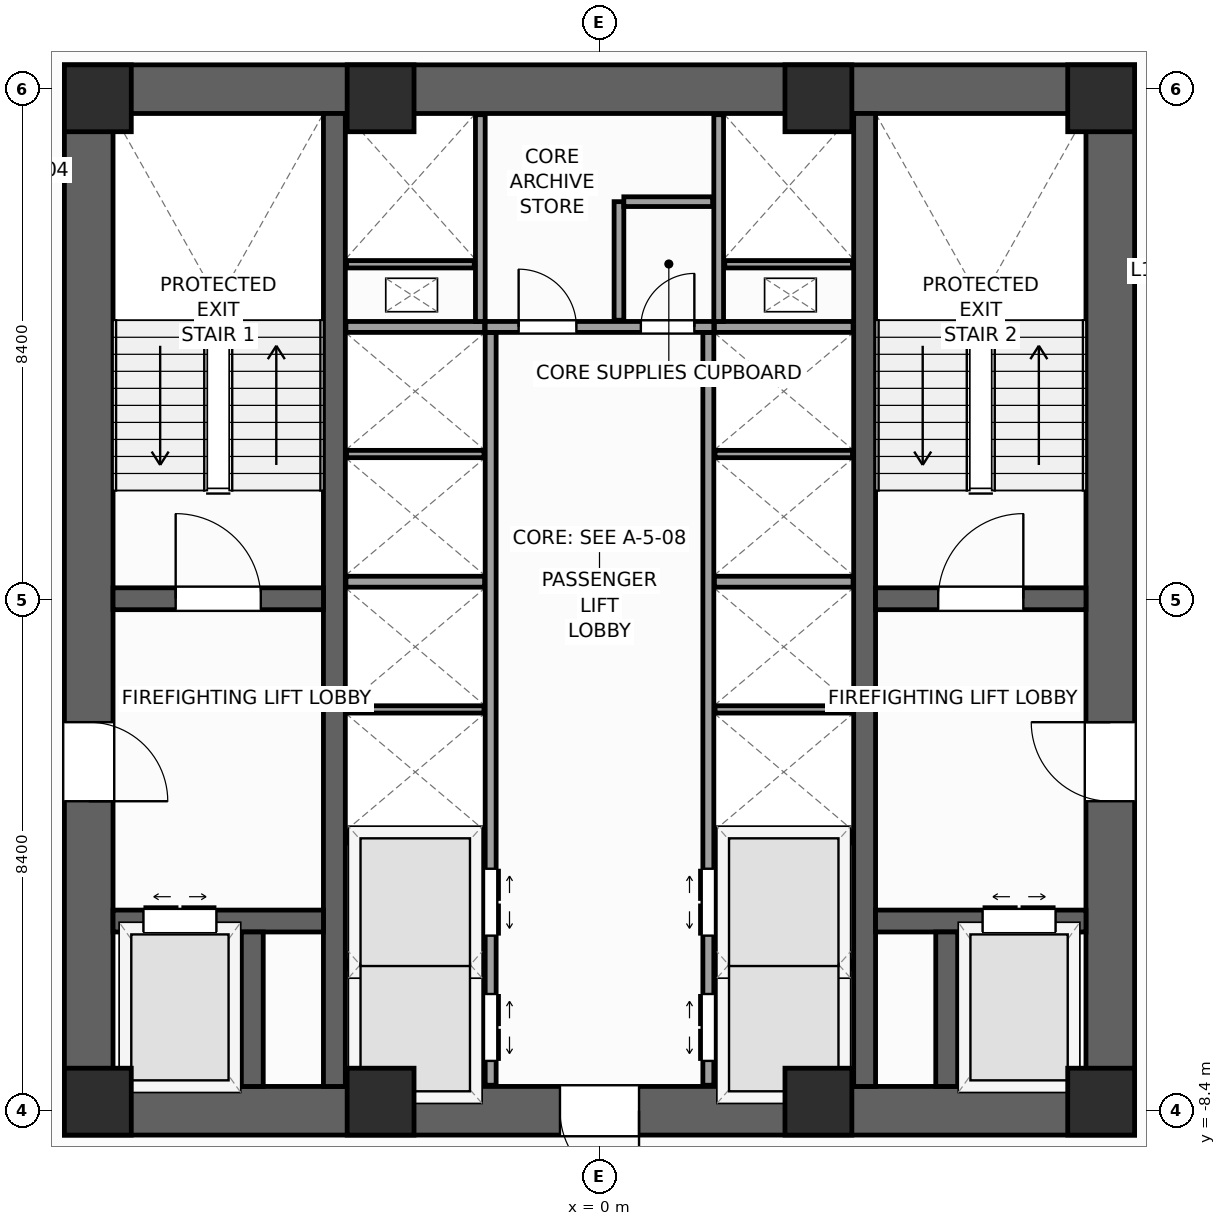
"""IFC4 building model, lengths in metres.
Left out: names, types, materials, properties, quantities, classifications, styles, units other than length and angle.
Written with IfcOpenShell. Run it as: python <this file> out.ifc"""

import sys

from ifc_helpers import new_model, si_unit, direction, frame, frame_2d, origin, origin_2d, place, context, subcontext, project, spatial, rectangle, extrude, source, transform, mapped, element, fill, save


model = new_model("IFC4")
c1 = context("Model", 3, precision=1e-05, world=origin(), true_north=direction((0.0, 1.0)))
c2 = subcontext(c1, "Body", "Model", "MODEL_VIEW")
j1 = project(units=[si_unit("LENGTHUNIT", "METRE"), si_unit("PLANEANGLEUNIT", "RADIAN")], contexts=[c1])
p1 = place(None, origin())
s1 = spatial("IfcSite", under=j1, at=p1, CompositionType="ELEMENT")
p2 = place(p1, origin())
s2 = spatial("IfcBuilding", under=s1, at=p2, CompositionType="ELEMENT")
p3 = place(p2, frame((0.0, 0.0, 66.0)))
s3 = spatial("IfcBuildingStorey", under=s2, at=p3, CompositionType="ELEMENT", Elevation=66.0)
p4 = place(p3, frame((-8.8, -8.4, 0.0), z_axis=(0.0, 0.0, 1.0), x_axis=(1.0, 0.0, 0.0)))
e1 = element("IfcWall", 1, at=p4, inside=s3, PredefinedType="SHEAR", context=c2, shape_type="SweptSolid", body=[
    extrude(rectangle(XDim=17.6, YDim=0.8, at=frame_2d((8.8, 0.0))), origin(), (0.0, 0.0, 1.0), 4.0),
])
p5 = place(p4, frame((8.15, 0.0, 0.0)))
e2 = element("IfcOpeningElement", 2, at=p5, cuts=e1, PredefinedType="OPENING", context=c2, shape_type="SweptSolid", body=[
    extrude(rectangle(XDim=1.3, YDim=2.2, at=frame_2d((0.65, 1.1))), frame((0.0, 0.41, 0.0), z_axis=(0.0, -1.0, 0.0), x_axis=(1.0, 0.0, 0.0)), (0.0, 0.0, 1.0), 0.82),
])
p6 = place(p3, frame((-8.8, 8.4, 0.0), z_axis=(0.0, 0.0, 1.0), x_axis=(1.0, 0.0, 0.0)))
e3 = element("IfcWall", 3, at=p6, inside=s3, PredefinedType="SHEAR", context=c2, shape_type="SweptSolid", body=[
    extrude(rectangle(XDim=17.6, YDim=0.8, at=frame_2d((8.8, 0.0))), origin(), (0.0, 0.0, 1.0), 4.0),
])
p7 = place(p3, frame((-8.4, -8.0, 0.0), z_axis=(0.0, 0.0, 1.0), x_axis=(0.0, 1.0, 0.0)))
e4 = element("IfcWall", 4, at=p7, inside=s3, PredefinedType="SHEAR", context=c2, shape_type="SweptSolid", body=[
    extrude(rectangle(XDim=16.0, YDim=0.8, at=frame_2d((8.0, 0.0))), origin(), (0.0, 0.0, 1.0), 4.0),
])
p8 = place(p7, frame((4.69, 0.0, 0.0)))
e5 = element("IfcOpeningElement", 5, at=p8, cuts=e4, PredefinedType="OPENING", context=c2, shape_type="SweptSolid", body=[
    extrude(rectangle(XDim=1.3, YDim=2.2, at=frame_2d((0.65, 1.1))), frame((0.0, 0.41, 0.0), z_axis=(0.0, -1.0, 0.0), x_axis=(1.0, 0.0, 0.0)), (0.0, 0.0, 1.0), 0.82),
])
p9 = place(p3, frame((8.4, -8.0, 0.0), z_axis=(0.0, 0.0, 1.0), x_axis=(0.0, 1.0, 0.0)))
e6 = element("IfcWall", 6, at=p9, inside=s3, PredefinedType="SHEAR", context=c2, shape_type="SweptSolid", body=[
    extrude(rectangle(XDim=16.0, YDim=0.8, at=frame_2d((8.0, 0.0))), origin(), (0.0, 0.0, 1.0), 4.0),
])
p10 = place(p9, frame((4.69, 0.0, 0.0)))
e7 = element("IfcOpeningElement", 7, at=p10, cuts=e6, PredefinedType="OPENING", context=c2, shape_type="SweptSolid", body=[
    extrude(rectangle(XDim=1.3, YDim=2.2, at=frame_2d((0.65, 1.1))), frame((0.0, 0.41, 0.0), z_axis=(0.0, -1.0, 0.0), x_axis=(1.0, 0.0, 0.0)), (0.0, 0.0, 1.0), 0.82),
])
for number, where, z_axis, x_axis in (
    (8, (-4.36, -8.0, 0.0), (0.0, 0.0, 1.0), (0.0, 1.0, 0.0)),
    (9, (4.36, -8.0, 0.0), (0.0, 0.0, 1.0), (0.0, 1.0, 0.0)),
):
    element("IfcWall", number, at=place(p3, frame(where, z_axis=z_axis, x_axis=x_axis)), inside=s3, PredefinedType="SHEAR", context=c2, shape_type="SweptSolid", body=[
        extrude(rectangle(XDim=16.0, YDim=0.36, at=frame_2d((8.0, 0.0))), origin(), (0.0, 0.0, 1.0), 4.0),
    ])
p11 = place(p3, frame((-8.0, 0.02, 0.0), z_axis=(0.0, 0.0, 1.0), x_axis=(1.0, 0.0, 0.0)))
e10 = element("IfcWall", 10, at=p11, inside=s3, PredefinedType="SHEAR", context=c2, shape_type="SweptSolid", body=[
    extrude(rectangle(XDim=3.46, YDim=0.36, at=frame_2d((1.73, 0.0))), origin(), (0.0, 0.0, 1.0), 4.0),
])
p12 = place(p11, frame((1.03, 0.0, 0.0)))
e11 = element("IfcOpeningElement", 11, at=p12, cuts=e10, PredefinedType="OPENING", context=c2, shape_type="SweptSolid", body=[
    extrude(rectangle(XDim=1.4, YDim=2.2, at=frame_2d((0.7, 1.1))), frame((0.0, 0.19, 0.0), z_axis=(0.0, -1.0, 0.0), x_axis=(1.0, 0.0, 0.0)), (0.0, 0.0, 1.0), 0.38),
])
p13 = place(p3, frame((4.54, 0.02, 0.0), z_axis=(0.0, 0.0, 1.0), x_axis=(1.0, 0.0, 0.0)))
e12 = element("IfcWall", 12, at=p13, inside=s3, PredefinedType="SHEAR", context=c2, shape_type="SweptSolid", body=[
    extrude(rectangle(XDim=3.46, YDim=0.36, at=frame_2d((1.73, 0.0))), origin(), (0.0, 0.0, 1.0), 4.0),
])
p14 = place(p13, frame((1.03, 0.0, 0.0)))
e13 = element("IfcOpeningElement", 13, at=p14, cuts=e12, PredefinedType="OPENING", context=c2, shape_type="SweptSolid", body=[
    extrude(rectangle(XDim=1.4, YDim=2.2, at=frame_2d((0.7, 1.1))), frame((0.0, 0.19, 0.0), z_axis=(0.0, -1.0, 0.0), x_axis=(1.0, 0.0, 0.0)), (0.0, 0.0, 1.0), 0.38),
])
p15 = place(p3, frame((-8.0, -5.28, 0.0), z_axis=(0.0, 0.0, 1.0), x_axis=(1.0, 0.0, 0.0)))
e14 = element("IfcWall", 14, at=p15, inside=s3, PredefinedType="SHEAR", context=c2, shape_type="SweptSolid", body=[
    extrude(rectangle(XDim=3.46, YDim=0.36, at=frame_2d((1.73, 0.0))), origin(), (0.0, 0.0, 1.0), 4.0),
])
p16 = place(p15, frame((0.5, 0.0, 0.0)))
e15 = element("IfcOpeningElement", 15, at=p16, cuts=e14, PredefinedType="OPENING", context=c2, shape_type="SweptSolid", body=[
    extrude(rectangle(XDim=1.2, YDim=2.25, at=frame_2d((0.6, 1.125))), frame((0.0, 0.19, 0.0), z_axis=(0.0, -1.0, 0.0), x_axis=(1.0, 0.0, 0.0)), (0.0, 0.0, 1.0), 0.38),
])
p17 = place(p3, frame((4.54, -5.28, 0.0), z_axis=(0.0, 0.0, 1.0), x_axis=(1.0, 0.0, 0.0)))
e16 = element("IfcWall", 16, at=p17, inside=s3, PredefinedType="SHEAR", context=c2, shape_type="SweptSolid", body=[
    extrude(rectangle(XDim=3.46, YDim=0.36, at=frame_2d((1.73, 0.0))), origin(), (0.0, 0.0, 1.0), 4.0),
])
p18 = place(p17, frame((1.76, 0.0, 0.0)))
e17 = element("IfcOpeningElement", 17, at=p18, cuts=e16, PredefinedType="OPENING", context=c2, shape_type="SweptSolid", body=[
    extrude(rectangle(XDim=1.2, YDim=2.25, at=frame_2d((0.6, 1.125))), frame((0.0, 0.19, 0.0), z_axis=(0.0, -1.0, 0.0), x_axis=(1.0, 0.0, 0.0)), (0.0, 0.0, 1.0), 0.38),
])
for number, where, z_axis, x_axis in (
    (18, (-5.71, -8.0, 0.0), (0.0, 0.0, 1.0), (0.0, 1.0, 0.0)),
    (19, (5.71, -8.0, 0.0), (0.0, 0.0, 1.0), (0.0, 1.0, 0.0)),
):
    element("IfcWall", number, at=place(p3, frame(where, z_axis=z_axis, x_axis=x_axis)), inside=s3, PredefinedType="SHEAR", context=c2, shape_type="SweptSolid", body=[
        extrude(rectangle(XDim=2.54, YDim=0.36, at=frame_2d((1.27, 0.0))), origin(), (0.0, 0.0, 1.0), 4.0),
    ])
m1 = source(origin(), c2, "Body", "SweptSolid", [
    extrude(rectangle(XDim=1.1, YDim=1.1, at=origin_2d()), origin(), (0.0, 0.0, 1.0), 4.0),
])
for number, where, z_axis, x_axis in (
    (20, (-8.25, -8.25, 0.0), (0.0, 0.0, 1.0), (1.0, 0.0, 0.0)),
    (21, (8.25, -8.25, 0.0), (0.0, 0.0, 1.0), (1.0, 0.0, 0.0)),
    (22, (8.25, 8.25, 0.0), (0.0, 0.0, 1.0), (1.0, 0.0, 0.0)),
    (23, (-8.25, 8.25, 0.0), (0.0, 0.0, 1.0), (1.0, 0.0, 0.0)),
    (24, (-3.6, -8.25, 0.0), (0.0, 0.0, 1.0), (1.0, 0.0, 0.0)),
    (25, (3.6, -8.25, 0.0), (0.0, 0.0, 1.0), (1.0, 0.0, 0.0)),
    (26, (-3.6, 8.25, 0.0), (0.0, 0.0, 1.0), (1.0, 0.0, 0.0)),
    (27, (3.6, 8.25, 0.0), (0.0, 0.0, 1.0), (1.0, 0.0, 0.0)),
):
    element("IfcColumn", number, at=place(p3, frame(where, z_axis=z_axis, x_axis=x_axis)), inside=s3, PredefinedType="PILASTER", context=c2, shape_type="MappedRepresentation", body=[
        mapped(m1, transform((0.0, 0.0, 0.0), scale=1.0)),
    ])
p19 = place(p3, frame((-1.79, -7.98, 0.0), z_axis=(0.0, 0.0, 1.0), x_axis=(0.0, 1.0, 0.0)))
e28 = element("IfcWall", 28, at=p19, inside=s3, PredefinedType="PARTITIONING", context=c2, shape_type="SweptSolid", body=[
    extrude(rectangle(XDim=12.38, YDim=0.18, at=frame_2d((6.19, 0.0))), origin(), (0.0, 0.0, 1.0), 3.72),
])
p20 = place(p19, frame((0.4, 0.0, 0.0)))
e29 = element("IfcOpeningElement", 29, at=p20, cuts=e28, PredefinedType="OPENING", context=c2, shape_type="SweptSolid", body=[
    extrude(rectangle(XDim=1.1, YDim=2.2, at=frame_2d((0.55, 1.1))), frame((0.0, 0.1, 0.0), z_axis=(0.0, -1.0, 0.0), x_axis=(1.0, 0.0, 0.0)), (0.0, 0.0, 1.0), 0.2),
])
p21 = place(p19, frame((2.46, 0.0, 0.0)))
e30 = element("IfcOpeningElement", 30, at=p21, cuts=e28, PredefinedType="OPENING", context=c2, shape_type="SweptSolid", body=[
    extrude(rectangle(XDim=1.1, YDim=2.2, at=frame_2d((0.55, 1.1))), frame((0.0, 0.1, 0.0), z_axis=(0.0, -1.0, 0.0), x_axis=(1.0, 0.0, 0.0)), (0.0, 0.0, 1.0), 0.2),
])
p22 = place(p3, frame((1.79, -7.98, 0.0), z_axis=(0.0, 0.0, 1.0), x_axis=(0.0, 1.0, 0.0)))
e31 = element("IfcWall", 31, at=p22, inside=s3, PredefinedType="PARTITIONING", context=c2, shape_type="SweptSolid", body=[
    extrude(rectangle(XDim=12.38, YDim=0.18, at=frame_2d((6.19, 0.0))), origin(), (0.0, 0.0, 1.0), 3.72),
])
p23 = place(p22, frame((0.4, 0.0, 0.0)))
e32 = element("IfcOpeningElement", 32, at=p23, cuts=e31, PredefinedType="OPENING", context=c2, shape_type="SweptSolid", body=[
    extrude(rectangle(XDim=1.1, YDim=2.2, at=frame_2d((0.55, 1.1))), frame((0.0, 0.1, 0.0), z_axis=(0.0, -1.0, 0.0), x_axis=(1.0, 0.0, 0.0)), (0.0, 0.0, 1.0), 0.2),
])
p24 = place(p22, frame((2.46, 0.0, 0.0)))
e33 = element("IfcOpeningElement", 33, at=p24, cuts=e31, PredefinedType="OPENING", context=c2, shape_type="SweptSolid", body=[
    extrude(rectangle(XDim=1.1, YDim=2.2, at=frame_2d((0.55, 1.1))), frame((0.0, 0.1, 0.0), z_axis=(0.0, -1.0, 0.0), x_axis=(1.0, 0.0, 0.0)), (0.0, 0.0, 1.0), 0.2),
])
p25 = place(p3, frame((-1.88, 4.49, 0.0), z_axis=(0.0, 0.0, 1.0), x_axis=(1.0, 0.0, 0.0)))
e34 = element("IfcWall", 34, at=p25, inside=s3, PredefinedType="PARTITIONING", context=c2, shape_type="SweptSolid", body=[
    extrude(rectangle(XDim=3.76, YDim=0.18, at=frame_2d((1.88, 0.0))), origin(), (0.0, 0.0, 1.0), 3.72),
])
p26 = place(p25, frame((0.55, 0.0, 0.0)))
e35 = element("IfcOpeningElement", 35, at=p26, cuts=e34, PredefinedType="OPENING", context=c2, shape_type="SweptSolid", body=[
    extrude(rectangle(XDim=0.95, YDim=2.1, at=frame_2d((0.475, 1.05))), frame((0.0, 0.1, 0.0), z_axis=(0.0, -1.0, 0.0), x_axis=(1.0, 0.0, 0.0)), (0.0, 0.0, 1.0), 0.2),
])
p27 = place(p25, frame((2.56, 0.0, 0.0)))
e36 = element("IfcOpeningElement", 36, at=p27, cuts=e34, PredefinedType="OPENING", context=c2, shape_type="SweptSolid", body=[
    extrude(rectangle(XDim=0.88, YDim=2.1, at=frame_2d((0.44, 1.05))), frame((0.0, 0.1, 0.0), z_axis=(0.0, -1.0, 0.0), x_axis=(1.0, 0.0, 0.0)), (0.0, 0.0, 1.0), 0.2),
])
for number, where, z_axis, x_axis in (
    (37, (-4.17, -3.9, 0.0), (0.0, 0.0, 1.0), (1.0, 0.0, 0.0)),
    (38, (1.89, -3.9, 0.0), (0.0, 0.0, 1.0), (1.0, 0.0, 0.0)),
    (39, (-4.17, 0.3, 0.0), (0.0, 0.0, 1.0), (1.0, 0.0, 0.0)),
    (40, (1.89, 0.3, 0.0), (0.0, 0.0, 1.0), (1.0, 0.0, 0.0)),
    (41, (-4.17, 4.49, 0.0), (0.0, 0.0, 1.0), (1.0, 0.0, 0.0)),
    (42, (1.89, 4.49, 0.0), (0.0, 0.0, 1.0), (1.0, 0.0, 0.0)),
):
    element("IfcWall", number, at=place(p3, frame(where, z_axis=z_axis, x_axis=x_axis)), inside=s3, PredefinedType="PARTITIONING", context=c2, shape_type="SweptSolid", body=[
        extrude(rectangle(XDim=2.28, YDim=0.18, at=frame_2d((1.14, 0.0))), origin(), (0.0, 0.0, 1.0), 3.72),
    ])
for number, where, z_axis, x_axis in (
    (43, (-4.16, -6.0, 0.0), (0.0, 0.0, 1.0), (1.0, 0.0, 0.0)),
    (44, (1.9, -6.0, 0.0), (0.0, 0.0, 1.0), (1.0, 0.0, 0.0)),
    (45, (-4.16, -1.8, 0.0), (0.0, 0.0, 1.0), (1.0, 0.0, 0.0)),
    (46, (1.9, -1.8, 0.0), (0.0, 0.0, 1.0), (1.0, 0.0, 0.0)),
    (47, (-4.16, 2.4, 0.0), (0.0, 0.0, 1.0), (1.0, 0.0, 0.0)),
    (48, (1.9, 2.4, 0.0), (0.0, 0.0, 1.0), (1.0, 0.0, 0.0)),
):
    element("IfcWall", number, at=place(p3, frame(where, z_axis=z_axis, x_axis=x_axis)), inside=s3, PredefinedType="PARTITIONING", context=c2, shape_type="SweptSolid", body=[
        extrude(rectangle(XDim=2.26, YDim=0.12, at=frame_2d((1.13, 0.0))), origin(), (0.0, 0.0, 1.0), 3.72),
    ])
for number, where, z_axis, x_axis in (
    (49, (-1.96, 4.58, 0.0), (0.0, 0.0, 1.0), (0.0, 1.0, 0.0)),
    (50, (1.96, 4.58, 0.0), (0.0, 0.0, 1.0), (0.0, 1.0, 0.0)),
):
    element("IfcWall", number, at=place(p3, frame(where, z_axis=z_axis, x_axis=x_axis)), inside=s3, PredefinedType="PARTITIONING", context=c2, shape_type="SweptSolid", body=[
        extrude(rectangle(XDim=3.4, YDim=0.16, at=frame_2d((1.7, 0.0))), origin(), (0.0, 0.0, 1.0), 3.72),
    ])
for number, where, z_axis, x_axis in (
    (51, (-4.16, 5.52, 0.0), (0.0, 0.0, 1.0), (1.0, 0.0, 0.0)),
    (52, (2.06, 5.52, 0.0), (0.0, 0.0, 1.0), (1.0, 0.0, 0.0)),
):
    element("IfcWall", number, at=place(p3, frame(where, z_axis=z_axis, x_axis=x_axis)), inside=s3, PredefinedType="PARTITIONING", context=c2, shape_type="SweptSolid", body=[
        extrude(rectangle(XDim=2.1, YDim=0.12, at=frame_2d((1.05, 0.0))), origin(), (0.0, 0.0, 1.0), 3.72),
    ])
p28 = place(p3, frame((0.32, 4.6, 0.0), z_axis=(0.0, 0.0, 1.0), x_axis=(0.0, 1.0, 0.0)))
e53 = element("IfcWall", 53, at=p28, inside=s3, PredefinedType="PARTITIONING", context=c2, shape_type="SweptSolid", body=[
    extrude(rectangle(XDim=1.95, YDim=0.16, at=frame_2d((0.975, 0.0))), origin(), (0.0, 0.0, 1.0), 3.72),
])
p29 = place(p3, frame((0.4, 6.55, 0.0), z_axis=(0.0, 0.0, 1.0), x_axis=(1.0, 0.0, 0.0)))
e54 = element("IfcWall", 54, at=p29, inside=s3, PredefinedType="PARTITIONING", context=c2, shape_type="SweptSolid", body=[
    extrude(rectangle(XDim=1.46, YDim=0.16, at=frame_2d((0.73, 0.0))), origin(), (0.0, 0.0, 1.0), 3.72),
])
m2 = source(origin(), c2, "Body", "SweptSolid", [
    extrude(rectangle(XDim=1.4, YDim=2.2, at=frame_2d((0.7, 1.1))), frame((0.0, 0.025, 0.0), z_axis=(0.0, -1.0, 0.0), x_axis=(1.0, 0.0, 0.0)), (0.0, 0.0, 1.0), 0.05),
])
p30 = place(p12, origin())
e55 = element("IfcDoor", 55, at=p30, inside=s3, OperationType="SINGLE_SWING_LEFT", PredefinedType="DOOR", context=c2, shape_type="MappedRepresentation", body=[
    mapped(m2, transform((0.0, 0.0, 0.0), scale=1.0)),
])
fill(e11, e55)
p31 = place(p14, origin())
e56 = element("IfcDoor", 56, at=p31, inside=s3, OperationType="SINGLE_SWING_RIGHT", PredefinedType="DOOR", context=c2, shape_type="MappedRepresentation", body=[
    mapped(m2, transform((0.0, 0.0, 0.0), scale=1.0)),
])
fill(e13, e56)
m3 = source(origin(), c2, "Body", "SweptSolid", [
    extrude(rectangle(XDim=1.3, YDim=2.2, at=frame_2d((0.65, 1.1))), frame((0.0, 0.025, 0.0), z_axis=(0.0, -1.0, 0.0), x_axis=(1.0, 0.0, 0.0)), (0.0, 0.0, 1.0), 0.05),
])
p32 = place(p8, frame((1.3, 0.0, 0.0), z_axis=(0.0, 0.0, 1.0), x_axis=(-1.0, 0.0, 0.0)))
e57 = element("IfcDoor", 57, at=p32, inside=s3, OperationType="SINGLE_SWING_LEFT", PredefinedType="DOOR", context=c2, shape_type="MappedRepresentation", body=[
    mapped(m3, transform((0.0, 0.0, 0.0), scale=1.0)),
])
fill(e5, e57)
p33 = place(p10, origin())
e58 = element("IfcDoor", 58, at=p33, inside=s3, OperationType="SINGLE_SWING_RIGHT", PredefinedType="DOOR", context=c2, shape_type="MappedRepresentation", body=[
    mapped(m3, transform((0.0, 0.0, 0.0), scale=1.0)),
])
fill(e7, e58)
p34 = place(p5, frame((1.3, 0.0, 0.0), z_axis=(0.0, 0.0, 1.0), x_axis=(-1.0, 0.0, 0.0)))
e59 = element("IfcDoor", 59, at=p34, inside=s3, OperationType="SINGLE_SWING_RIGHT", PredefinedType="DOOR", context=c2, shape_type="MappedRepresentation", body=[
    mapped(m3, transform((0.0, 0.0, 0.0), scale=1.0)),
])
fill(e2, e59)
m4 = source(origin(), c2, "Body", "SweptSolid", [
    extrude(rectangle(XDim=1.2, YDim=2.25, at=frame_2d((0.6, 1.125))), frame((0.0, 0.025, 0.0), z_axis=(0.0, -1.0, 0.0), x_axis=(1.0, 0.0, 0.0)), (0.0, 0.0, 1.0), 0.05),
])
p35 = place(p16, origin())
e60 = element("IfcDoor", 60, at=p35, inside=s3, OperationType="DOUBLE_DOOR_SLIDING", PredefinedType="DOOR", context=c2, shape_type="MappedRepresentation", body=[
    mapped(m4, transform((0.0, 0.0, 0.0), scale=1.0)),
])
fill(e15, e60)
p36 = place(p18, origin())
e61 = element("IfcDoor", 61, at=p36, inside=s3, OperationType="DOUBLE_DOOR_SLIDING", PredefinedType="DOOR", context=c2, shape_type="MappedRepresentation", body=[
    mapped(m4, transform((0.0, 0.0, 0.0), scale=1.0)),
])
fill(e17, e61)
m5 = source(origin(), c2, "Body", "SweptSolid", [
    extrude(rectangle(XDim=1.1, YDim=2.2, at=frame_2d((0.55, 1.1))), frame((0.0, 0.025, 0.0), z_axis=(0.0, -1.0, 0.0), x_axis=(1.0, 0.0, 0.0)), (0.0, 0.0, 1.0), 0.05),
])
p37 = place(p20, frame((1.1, 0.0, 0.0), z_axis=(0.0, 0.0, 1.0), x_axis=(-1.0, 0.0, 0.0)))
e62 = element("IfcDoor", 62, at=p37, inside=s3, OperationType="DOUBLE_DOOR_SLIDING", PredefinedType="DOOR", context=c2, shape_type="MappedRepresentation", body=[
    mapped(m5, transform((0.0, 0.0, 0.0), scale=1.0)),
])
fill(e29, e62)
p38 = place(p21, frame((1.1, 0.0, 0.0), z_axis=(0.0, 0.0, 1.0), x_axis=(-1.0, 0.0, 0.0)))
e63 = element("IfcDoor", 63, at=p38, inside=s3, OperationType="DOUBLE_DOOR_SLIDING", PredefinedType="DOOR", context=c2, shape_type="MappedRepresentation", body=[
    mapped(m5, transform((0.0, 0.0, 0.0), scale=1.0)),
])
fill(e30, e63)
p39 = place(p23, origin())
e64 = element("IfcDoor", 64, at=p39, inside=s3, OperationType="DOUBLE_DOOR_SLIDING", PredefinedType="DOOR", context=c2, shape_type="MappedRepresentation", body=[
    mapped(m5, transform((0.0, 0.0, 0.0), scale=1.0)),
])
fill(e32, e64)
p40 = place(p24, origin())
e65 = element("IfcDoor", 65, at=p40, inside=s3, OperationType="DOUBLE_DOOR_SLIDING", PredefinedType="DOOR", context=c2, shape_type="MappedRepresentation", body=[
    mapped(m5, transform((0.0, 0.0, 0.0), scale=1.0)),
])
fill(e33, e65)
m6 = source(origin(), c2, "Body", "SweptSolid", [
    extrude(rectangle(XDim=0.95, YDim=2.1, at=frame_2d((0.475, 1.05))), frame((0.0, 0.025, 0.0), z_axis=(0.0, -1.0, 0.0), x_axis=(1.0, 0.0, 0.0)), (0.0, 0.0, 1.0), 0.05),
])
p41 = place(p26, origin())
e66 = element("IfcDoor", 66, at=p41, inside=s3, OperationType="SINGLE_SWING_LEFT", PredefinedType="DOOR", context=c2, shape_type="MappedRepresentation", body=[
    mapped(m6, transform((0.0, 0.0, 0.0), scale=1.0)),
])
fill(e35, e66)
m7 = source(origin(), c2, "Body", "SweptSolid", [
    extrude(rectangle(XDim=0.88, YDim=2.1, at=frame_2d((0.44, 1.05))), frame((0.0, 0.025, 0.0), z_axis=(0.0, -1.0, 0.0), x_axis=(1.0, 0.0, 0.0)), (0.0, 0.0, 1.0), 0.05),
])
p42 = place(p27, origin())
e67 = element("IfcDoor", 67, at=p42, inside=s3, OperationType="SINGLE_SWING_RIGHT", PredefinedType="DOOR", context=c2, shape_type="MappedRepresentation", body=[
    mapped(m7, transform((0.0, 0.0, 0.0), scale=1.0)),
])
fill(e36, e67)
save(model, sys.argv[1])
